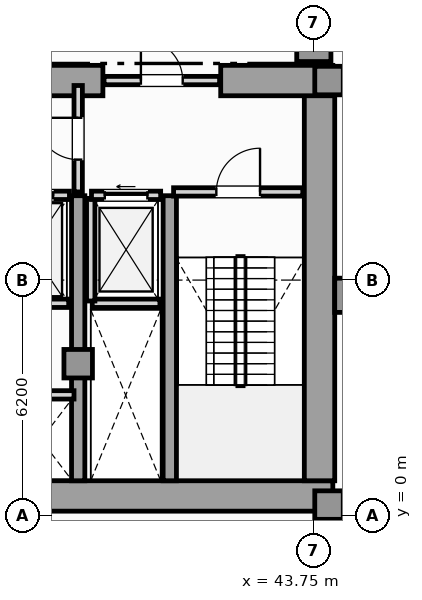
"""IFC4 building model, lengths in metres.
Left out: names, types, materials, properties, quantities, classifications, styles, units other than length and angle.
Written with IfcOpenShell. Run it as: python <this file> out.ifc"""

import sys

from ifc_helpers import new_model, si_unit, direction, frame, frame_2d, origin, origin_2d, place, context, subcontext, project, spatial, rectangle, extrude, element, fill, save


model = new_model("IFC4")
c1 = context("Model", 3, precision=1e-05, world=origin(), true_north=direction((0.0, 1.0)))
c2 = subcontext(c1, "Body", "Model", "MODEL_VIEW")
j1 = project(units=[si_unit("LENGTHUNIT", "METRE"), si_unit("PLANEANGLEUNIT", "RADIAN")], contexts=[c1])
p1 = place(None, origin())
s1 = spatial("IfcSite", under=j1, at=p1, CompositionType="ELEMENT")
p2 = place(p1, origin())
s2 = spatial("IfcBuilding", under=s1, at=p2, CompositionType="ELEMENT")
p3 = place(p2, frame((0.0, 0.0, 19.8)))
s3 = spatial("IfcBuildingStorey", under=s2, at=p3, CompositionType="ELEMENT", Elevation=19.8)
p4 = place(p3, frame((13.25, 0.52, 0.0), z_axis=(0.0, 0.0, 1.0), x_axis=(1.0, 0.0, 0.0)))
e1 = element("IfcWall", 1, at=p4, inside=s3, PredefinedType="SHEAR", context=c2, shape_type="SweptSolid", body=[
    extrude(rectangle(XDim=31.0, YDim=0.8, at=frame_2d((15.5, 0.0))), origin(), (0.0, 0.0, 1.0), 4.4),
])
p5 = place(p3, frame((43.9, 0.92, 0.0), z_axis=(0.0, 0.0, 1.0), x_axis=(0.0, 1.0, 0.0)))
e2 = element("IfcWall", 2, at=p5, inside=s3, PredefinedType="SHEAR", context=c2, shape_type="SweptSolid", body=[
    extrude(rectangle(XDim=10.53, YDim=0.8, at=frame_2d((5.265, 0.0))), origin(), (0.0, 0.0, 1.0), 4.4),
])
p6 = place(p3, frame((30.9, 11.45, 0.0), z_axis=(0.0, 0.0, 1.0), x_axis=(1.0, 0.0, 0.0)))
e3 = element("IfcWall", 3, at=p6, inside=s3, PredefinedType="SHEAR", context=c2, shape_type="SweptSolid", body=[
    extrude(rectangle(XDim=7.3, YDim=0.8, at=frame_2d((3.65, 0.0))), origin(), (0.0, 0.0, 1.0), 4.4),
])
p7 = place(p3, frame((41.3, 11.45, 0.0), z_axis=(0.0, 0.0, 1.0), x_axis=(1.0, 0.0, 0.0)))
e4 = element("IfcWall", 4, at=p7, inside=s3, PredefinedType="SHEAR", context=c2, shape_type="SweptSolid", body=[
    extrude(rectangle(XDim=2.95, YDim=0.8, at=frame_2d((1.475, 0.0))), origin(), (0.0, 0.0, 1.0), 4.4),
])
for number, where, z_axis, x_axis in (
    (5, (37.55, 0.92, 0.0), (0.0, 0.0, 1.0), (0.0, 1.0, 0.0)),
    (6, (39.96, 0.92, 0.0), (0.0, 0.0, 1.0), (0.0, 1.0, 0.0)),
):
    element("IfcWall", number, at=place(p3, frame(where, z_axis=z_axis, x_axis=x_axis)), inside=s3, PredefinedType="SHEAR", context=c2, shape_type="SweptSolid", body=[
        extrude(rectangle(XDim=7.5, YDim=0.35, at=frame_2d((3.75, 0.0))), origin(), (0.0, 0.0, 1.0), 4.4),
    ])
p8 = place(p3, frame((44.6, 5.8, 0.0), z_axis=(0.0, 0.0, 1.0), x_axis=(1.0, 0.0, 0.0)))
e7 = element("IfcColumn", 7, at=p8, inside=s3, PredefinedType="PILASTER", context=c2, shape_type="SweptSolid", body=[
    extrude(rectangle(XDim=0.6, YDim=0.9, at=origin_2d()), origin(), (0.0, 0.0, 1.0), 4.8),
])
for number, where, z_axis, x_axis in (
    (8, (44.15, 0.28, 0.0), (0.0, 0.0, 1.0), (1.0, 0.0, 0.0)),
    (9, (44.15, 11.45, 0.0), (0.0, 0.0, 1.0), (1.0, 0.0, 0.0)),
    (10, (37.55, 4.0, 0.0), (0.0, 0.0, 1.0), (1.0, 0.0, 0.0)),
):
    element("IfcColumn", number, at=place(p3, frame(where, z_axis=z_axis, x_axis=x_axis)), inside=s3, PredefinedType="COLUMN", context=c2, shape_type="SweptSolid", body=[
        extrude(rectangle(XDim=0.75, YDim=0.75, at=origin_2d()), origin(), (0.0, 0.0, 1.0), 4.8),
    ])
p9 = place(p3, frame((43.75, 12.4, 0.0), z_axis=(0.0, 0.0, 1.0), x_axis=(1.0, 0.0, 0.0)))
e11 = element("IfcColumn", 11, at=p9, inside=s3, PredefinedType="COLUMN", context=c2, shape_type="SweptSolid", body=[
    extrude(rectangle(XDim=0.9, YDim=0.9, at=origin_2d()), origin(), (0.0, 0.0, 1.0), 4.8),
])
p10 = place(p3, frame((37.92, 5.59, 0.0), z_axis=(0.0, 0.0, 1.0), x_axis=(1.0, 0.0, 0.0)))
e12 = element("IfcWall", 12, at=p10, inside=s3, PredefinedType="SOLIDWALL", context=c2, shape_type="SweptSolid", body=[
    extrude(rectangle(XDim=1.78, YDim=0.22, at=frame_2d((0.89, 0.0))), origin(), (0.0, 0.0, 1.0), 4.4),
])
p11 = place(p3, frame((37.88, 5.65, 0.0), z_axis=(0.0, 0.0, 1.0), x_axis=(0.0, 1.0, 0.0)))
e13 = element("IfcWall", 13, at=p11, inside=s3, PredefinedType="SOLIDWALL", context=c2, shape_type="SweptSolid", body=[
    extrude(rectangle(XDim=2.7, YDim=0.22, at=frame_2d((1.35, 0.0))), origin(), (0.0, 0.0, 1.0), 4.4),
])
p12 = place(p3, frame((37.9, 8.43, 0.0), z_axis=(0.0, 0.0, 1.0), x_axis=(1.0, 0.0, 0.0)))
e14 = element("IfcWall", 14, at=p12, inside=s3, PredefinedType="SOLIDWALL", context=c2, shape_type="SweptSolid", body=[
    extrude(rectangle(XDim=1.82, YDim=0.22, at=frame_2d((0.91, 0.0))), origin(), (0.0, 0.0, 1.0), 4.4),
])
p13 = place(p12, frame((0.35, 0.0, 0.0)))
e15 = element("IfcOpeningElement", 15, at=p13, cuts=e14, PredefinedType="OPENING", context=c2, shape_type="SweptSolid", body=[
    extrude(rectangle(XDim=1.12, YDim=2.25, at=frame_2d((0.56, 1.125))), frame((0.0, 0.12, 0.0), z_axis=(0.0, -1.0, 0.0), x_axis=(1.0, 0.0, 0.0)), (0.0, 0.0, 1.0), 0.24),
])
p14 = place(p3, frame((35.3, 5.59, 0.0), z_axis=(0.0, 0.0, 1.0), x_axis=(1.0, 0.0, 0.0)))
e16 = element("IfcWall", 16, at=p14, inside=s3, PredefinedType="SOLIDWALL", context=c2, shape_type="SweptSolid", body=[
    extrude(rectangle(XDim=2.0, YDim=0.22, at=frame_2d((1.0, 0.0))), origin(), (0.0, 0.0, 1.0), 4.4),
])
p15 = place(p3, frame((35.28, 8.43, 0.0), z_axis=(0.0, 0.0, 1.0), x_axis=(1.0, 0.0, 0.0)))
e17 = element("IfcWall", 17, at=p15, inside=s3, PredefinedType="SOLIDWALL", context=c2, shape_type="SweptSolid", body=[
    extrude(rectangle(XDim=2.04, YDim=0.22, at=frame_2d((1.02, 0.0))), origin(), (0.0, 0.0, 1.0), 4.4),
])
p16 = place(p15, frame((0.43, 0.0, 0.0)))
e18 = element("IfcOpeningElement", 18, at=p16, cuts=e17, PredefinedType="OPENING", context=c2, shape_type="SweptSolid", body=[
    extrude(rectangle(XDim=1.18, YDim=2.2, at=frame_2d((0.59, 1.1))), frame((0.0, 0.12, 0.0), z_axis=(0.0, -1.0, 0.0), x_axis=(1.0, 0.0, 0.0)), (0.0, 0.0, 1.0), 0.24),
])
p17 = place(p3, frame((35.7, 3.18, 0.0), z_axis=(0.0, 0.0, 1.0), x_axis=(1.0, 0.0, 0.0)))
e19 = element("IfcWall", 19, at=p17, inside=s3, PredefinedType="SOLIDWALL", context=c2, shape_type="SweptSolid", body=[
    extrude(rectangle(XDim=1.74, YDim=0.22, at=frame_2d((0.87, 0.0))), origin(), (0.0, 0.0, 1.0), 4.4),
])
p18 = place(p3, frame((40.06, 8.52, 0.0), z_axis=(0.0, 0.0, 1.0), x_axis=(1.0, 0.0, 0.0)))
e20 = element("IfcWall", 20, at=p18, inside=s3, PredefinedType="SOLIDWALL", context=c2, shape_type="SweptSolid", body=[
    extrude(rectangle(XDim=3.4, YDim=0.22, at=frame_2d((1.7, 0.0))), origin(), (0.0, 0.0, 1.0), 4.4),
])
p19 = place(p18, frame((1.125, 0.0, 0.0)))
e21 = element("IfcOpeningElement", 21, at=p19, cuts=e20, PredefinedType="OPENING", context=c2, shape_type="SweptSolid", body=[
    extrude(rectangle(XDim=1.15, YDim=2.2, at=frame_2d((0.575, 1.1))), frame((0.0, 0.12, 0.0), z_axis=(0.0, -1.0, 0.0), x_axis=(1.0, 0.0, 0.0)), (0.0, 0.0, 1.0), 0.24),
])
p20 = place(p3, frame((37.55, 8.52, 0.0), z_axis=(0.0, 0.0, 1.0), x_axis=(0.0, 1.0, 0.0)))
e22 = element("IfcWall", 22, at=p20, inside=s3, PredefinedType="SOLIDWALL", context=c2, shape_type="SweptSolid", body=[
    extrude(rectangle(XDim=2.8, YDim=0.22, at=frame_2d((1.4, 0.0))), origin(), (0.0, 0.0, 1.0), 3.855),
])
p21 = place(p20, frame((0.85, 0.0, 0.0)))
e23 = element("IfcOpeningElement", 23, at=p21, cuts=e22, PredefinedType="OPENING", context=c2, shape_type="SweptSolid", body=[
    extrude(rectangle(XDim=1.1, YDim=2.2, at=frame_2d((0.55, 1.1))), frame((0.0, 0.12, 0.0), z_axis=(0.0, -1.0, 0.0), x_axis=(1.0, 0.0, 0.0)), (0.0, 0.0, 1.0), 0.24),
])
p22 = place(p3, frame((38.23, 11.45, 0.0), z_axis=(0.0, 0.0, 1.0), x_axis=(1.0, 0.0, 0.0)))
e24 = element("IfcWall", 24, at=p22, inside=s3, PredefinedType="SOLIDWALL", context=c2, shape_type="SweptSolid", body=[
    extrude(rectangle(XDim=3.04, YDim=0.22, at=frame_2d((1.52, 0.0))), origin(), (0.0, 0.0, 1.0), 4.4),
])
p23 = place(p22, frame((0.97, 0.0, 0.0)))
e25 = element("IfcOpeningElement", 25, at=p23, cuts=e24, PredefinedType="OPENING", context=c2, shape_type="SweptSolid", body=[
    extrude(rectangle(XDim=1.1, YDim=2.2, at=frame_2d((0.55, 1.1))), frame((0.0, 0.12, 0.0), z_axis=(0.0, -1.0, 0.0), x_axis=(1.0, 0.0, 0.0)), (0.0, 0.0, 1.0), 0.24),
])
p24 = place(p13, origin())
e26 = element("IfcDoor", 26, at=p24, inside=s3, OperationType="SLIDING_TO_LEFT", PredefinedType="DOOR", context=c2, shape_type="SweptSolid", body=[
    extrude(rectangle(XDim=1.12, YDim=2.25, at=frame_2d((0.56, 1.125))), frame((0.0, 0.025, 0.0), z_axis=(0.0, -1.0, 0.0), x_axis=(1.0, 0.0, 0.0)), (0.0, 0.0, 1.0), 0.05),
])
fill(e15, e26)
p25 = place(p16, origin())
e27 = element("IfcDoor", 27, at=p25, inside=s3, OperationType="SLIDING_TO_RIGHT", PredefinedType="DOOR", context=c2, shape_type="SweptSolid", body=[
    extrude(rectangle(XDim=1.18, YDim=2.2, at=frame_2d((0.59, 1.1))), frame((0.0, 0.025, 0.0), z_axis=(0.0, -1.0, 0.0), x_axis=(1.0, 0.0, 0.0)), (0.0, 0.0, 1.0), 0.05),
])
fill(e18, e27)
p26 = place(p19, origin())
e28 = element("IfcDoor", 28, at=p26, inside=s3, OperationType="SINGLE_SWING_RIGHT", PredefinedType="DOOR", context=c2, shape_type="SweptSolid", body=[
    extrude(rectangle(XDim=1.15, YDim=2.2, at=frame_2d((0.575, 1.1))), frame((0.0, 0.025, 0.0), z_axis=(0.0, -1.0, 0.0), x_axis=(1.0, 0.0, 0.0)), (0.0, 0.0, 1.0), 0.05),
])
fill(e21, e28)
p27 = place(p21, origin())
e29 = element("IfcDoor", 29, at=p27, inside=s3, OperationType="SINGLE_SWING_RIGHT", PredefinedType="DOOR", context=c2, shape_type="SweptSolid", body=[
    extrude(rectangle(XDim=1.1, YDim=2.2, at=frame_2d((0.55, 1.1))), frame((0.0, 0.025, 0.0), z_axis=(0.0, -1.0, 0.0), x_axis=(1.0, 0.0, 0.0)), (0.0, 0.0, 1.0), 0.05),
])
fill(e23, e29)
p28 = place(p23, origin())
e30 = element("IfcDoor", 30, at=p28, inside=s3, OperationType="SINGLE_SWING_LEFT", PredefinedType="DOOR", context=c2, shape_type="SweptSolid", body=[
    extrude(rectangle(XDim=1.1, YDim=2.2, at=frame_2d((0.55, 1.1))), frame((0.0, 0.025, 0.0), z_axis=(0.0, -1.0, 0.0), x_axis=(1.0, 0.0, 0.0)), (0.0, 0.0, 1.0), 0.05),
])
fill(e25, e30)
save(model, sys.argv[1])
